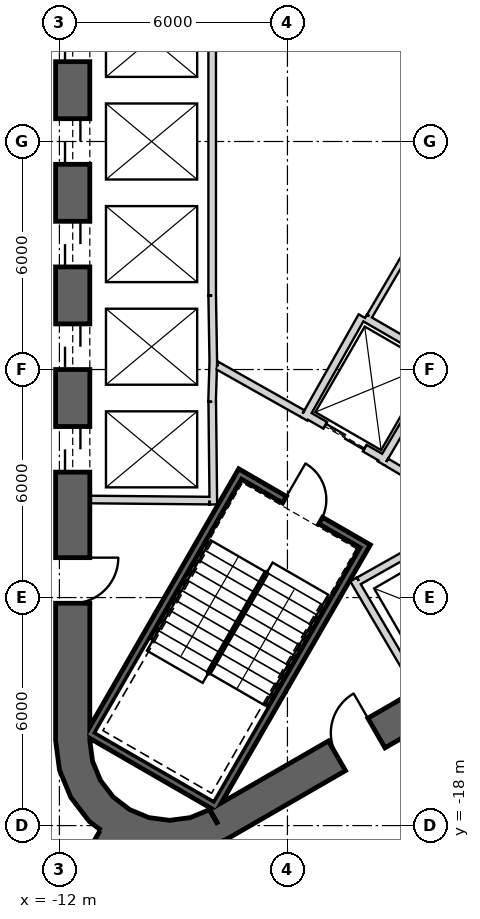
"""IFC4 building model, lengths in metres.
Left out: names, types, materials, properties, quantities, classifications, styles, units other than length and angle.
Written with IfcOpenShell. Run it as: python <this file> out.ifc"""

import sys

from ifc_helpers import new_model, si_unit, direction, frame, frame_2d, origin, place, context, subcontext, project, spatial, polyline, rectangle, outline, extrude, element, fill, save


model = new_model("IFC4")
c1 = context("Model", 3, precision=1e-05, world=origin(), true_north=direction((0.0, 1.0)))
c2 = subcontext(c1, "Body", "Model", "MODEL_VIEW")
j1 = project(units=[si_unit("LENGTHUNIT", "METRE"), si_unit("PLANEANGLEUNIT", "RADIAN")], contexts=[c1])
p1 = place(None, origin())
s1 = spatial("IfcSite", under=j1, at=p1, CompositionType="ELEMENT")
p2 = place(p1, origin())
s2 = spatial("IfcBuilding", under=s1, at=p2, CompositionType="ELEMENT")
p3 = place(p2, frame((0.0, 0.0, 131.6)))
s3 = spatial("IfcBuildingStorey", under=s2, at=p3, CompositionType="ELEMENT", Elevation=131.6)
p4 = place(p3, frame((19.475, 2.208, 0.0), z_axis=(0.0, 0.0, 1.0), x_axis=(-0.866028369851, 0.499994862586, 0.0)))
e1 = element("IfcWall", 1, at=p4, inside=s3, PredefinedType="SHEAR", context=c2, shape_type="SweptSolid", body=[
    extrude(rectangle(XDim=31.523, YDim=0.9, at=frame_2d((15.762, 0.0))), origin(), (0.0, 0.0, 1.0), 4.1),
])
p5 = place(p4, frame((7.062, 0.0, 0.0)))
e2 = element("IfcOpeningElement", 2, at=p5, cuts=e1, PredefinedType="OPENING", context=c2, shape_type="SweptSolid", body=[
    extrude(rectangle(XDim=1.2, YDim=2.4, at=frame_2d((0.6, 1.2))), frame((0.0, 0.46, 0.0), z_axis=(0.0, -1.0, 0.0), x_axis=(1.0, 0.0, 0.0)), (0.0, 0.0, 1.0), 0.92),
])
p6 = place(p4, frame((9.762, 0.0, 0.0)))
e3 = element("IfcOpeningElement", 3, at=p6, cuts=e1, PredefinedType="OPENING", context=c2, shape_type="SweptSolid", body=[
    extrude(rectangle(XDim=1.2, YDim=2.4, at=frame_2d((0.6, 1.2))), frame((0.0, 0.46, 0.0), z_axis=(0.0, -1.0, 0.0), x_axis=(1.0, 0.0, 0.0)), (0.0, 0.0, 1.0), 0.92),
])
p7 = place(p4, frame((12.462, 0.0, 0.0)))
e4 = element("IfcOpeningElement", 4, at=p7, cuts=e1, PredefinedType="OPENING", context=c2, shape_type="SweptSolid", body=[
    extrude(rectangle(XDim=1.2, YDim=2.4, at=frame_2d((0.6, 1.2))), frame((0.0, 0.46, 0.0), z_axis=(0.0, -1.0, 0.0), x_axis=(1.0, 0.0, 0.0)), (0.0, 0.0, 1.0), 0.92),
])
p8 = place(p4, frame((15.162, 0.0, 0.0)))
e5 = element("IfcOpeningElement", 5, at=p8, cuts=e1, PredefinedType="OPENING", context=c2, shape_type="SweptSolid", body=[
    extrude(rectangle(XDim=1.2, YDim=2.4, at=frame_2d((0.6, 1.2))), frame((0.0, 0.46, 0.0), z_axis=(0.0, -1.0, 0.0), x_axis=(1.0, 0.0, 0.0)), (0.0, 0.0, 1.0), 0.92),
])
p9 = place(p4, frame((17.862, 0.0, 0.0)))
e6 = element("IfcOpeningElement", 6, at=p9, cuts=e1, PredefinedType="OPENING", context=c2, shape_type="SweptSolid", body=[
    extrude(rectangle(XDim=1.2, YDim=2.4, at=frame_2d((0.6, 1.2))), frame((0.0, 0.46, 0.0), z_axis=(0.0, -1.0, 0.0), x_axis=(1.0, 0.0, 0.0)), (0.0, 0.0, 1.0), 0.92),
])
p10 = place(p4, frame((20.562, 0.0, 0.0)))
e7 = element("IfcOpeningElement", 7, at=p10, cuts=e1, PredefinedType="OPENING", context=c2, shape_type="SweptSolid", body=[
    extrude(rectangle(XDim=1.2, YDim=2.4, at=frame_2d((0.6, 1.2))), frame((0.0, 0.46, 0.0), z_axis=(0.0, -1.0, 0.0), x_axis=(1.0, 0.0, 0.0)), (0.0, 0.0, 1.0), 0.92),
])
p11 = place(p4, frame((23.262, 0.0, 0.0)))
e8 = element("IfcOpeningElement", 8, at=p11, cuts=e1, PredefinedType="OPENING", context=c2, shape_type="SweptSolid", body=[
    extrude(rectangle(XDim=1.2, YDim=2.4, at=frame_2d((0.6, 1.2))), frame((0.0, 0.46, 0.0), z_axis=(0.0, -1.0, 0.0), x_axis=(1.0, 0.0, 0.0)), (0.0, 0.0, 1.0), 0.92),
])
p12 = place(p4, frame((3.612, 0.0, 0.0)))
e9 = element("IfcOpeningElement", 9, at=p12, cuts=e1, PredefinedType="OPENING", context=c2, shape_type="SweptSolid", body=[
    extrude(rectangle(XDim=1.2, YDim=2.4, at=frame_2d((0.6, 1.2))), frame((0.0, 0.46, 0.0), z_axis=(0.0, -1.0, 0.0), x_axis=(1.0, 0.0, 0.0)), (0.0, 0.0, 1.0), 0.92),
])
p13 = place(p4, frame((26.712, 0.0, 0.0)))
e10 = element("IfcOpeningElement", 10, at=p13, cuts=e1, PredefinedType="OPENING", context=c2, shape_type="SweptSolid", body=[
    extrude(rectangle(XDim=1.2, YDim=2.4, at=frame_2d((0.6, 1.2))), frame((0.0, 0.46, 0.0), z_axis=(0.0, -1.0, 0.0), x_axis=(1.0, 0.0, 0.0)), (0.0, 0.0, 1.0), 0.92),
])
p14 = place(p3, frame((-11.65, 15.762, 0.0), z_axis=(0.0, 0.0, 1.0), x_axis=(0.0, -1.0, 0.0)))
e11 = element("IfcWall", 11, at=p14, inside=s3, PredefinedType="SHEAR", context=c2, shape_type="SweptSolid", body=[
    extrude(rectangle(XDim=31.523, YDim=0.9, at=frame_2d((15.762, 0.0))), origin(), (0.0, 0.0, 1.0), 4.1),
])
p15 = place(p14, frame((7.062, 0.0, 0.0)))
e12 = element("IfcOpeningElement", 12, at=p15, cuts=e11, PredefinedType="OPENING", context=c2, shape_type="SweptSolid", body=[
    extrude(rectangle(XDim=1.2, YDim=2.4, at=frame_2d((0.6, 1.2))), frame((0.0, 0.46, 0.0), z_axis=(0.0, -1.0, 0.0), x_axis=(1.0, 0.0, 0.0)), (0.0, 0.0, 1.0), 0.92),
])
p16 = place(p14, frame((9.762, 0.0, 0.0)))
e13 = element("IfcOpeningElement", 13, at=p16, cuts=e11, PredefinedType="OPENING", context=c2, shape_type="SweptSolid", body=[
    extrude(rectangle(XDim=1.2, YDim=2.4, at=frame_2d((0.6, 1.2))), frame((0.0, 0.46, 0.0), z_axis=(0.0, -1.0, 0.0), x_axis=(1.0, 0.0, 0.0)), (0.0, 0.0, 1.0), 0.92),
])
p17 = place(p14, frame((12.462, 0.0, 0.0)))
e14 = element("IfcOpeningElement", 14, at=p17, cuts=e11, PredefinedType="OPENING", context=c2, shape_type="SweptSolid", body=[
    extrude(rectangle(XDim=1.2, YDim=2.4, at=frame_2d((0.6, 1.2))), frame((0.0, 0.46, 0.0), z_axis=(0.0, -1.0, 0.0), x_axis=(1.0, 0.0, 0.0)), (0.0, 0.0, 1.0), 0.92),
])
p18 = place(p14, frame((15.162, 0.0, 0.0)))
e15 = element("IfcOpeningElement", 15, at=p18, cuts=e11, PredefinedType="OPENING", context=c2, shape_type="SweptSolid", body=[
    extrude(rectangle(XDim=1.2, YDim=2.4, at=frame_2d((0.6, 1.2))), frame((0.0, 0.46, 0.0), z_axis=(0.0, -1.0, 0.0), x_axis=(1.0, 0.0, 0.0)), (0.0, 0.0, 1.0), 0.92),
])
p19 = place(p14, frame((17.862, 0.0, 0.0)))
e16 = element("IfcOpeningElement", 16, at=p19, cuts=e11, PredefinedType="OPENING", context=c2, shape_type="SweptSolid", body=[
    extrude(rectangle(XDim=1.2, YDim=2.4, at=frame_2d((0.6, 1.2))), frame((0.0, 0.46, 0.0), z_axis=(0.0, -1.0, 0.0), x_axis=(1.0, 0.0, 0.0)), (0.0, 0.0, 1.0), 0.92),
])
p20 = place(p14, frame((20.562, 0.0, 0.0)))
e17 = element("IfcOpeningElement", 17, at=p20, cuts=e11, PredefinedType="OPENING", context=c2, shape_type="SweptSolid", body=[
    extrude(rectangle(XDim=1.2, YDim=2.4, at=frame_2d((0.6, 1.2))), frame((0.0, 0.46, 0.0), z_axis=(0.0, -1.0, 0.0), x_axis=(1.0, 0.0, 0.0)), (0.0, 0.0, 1.0), 0.92),
])
p21 = place(p14, frame((23.262, 0.0, 0.0)))
e18 = element("IfcOpeningElement", 18, at=p21, cuts=e11, PredefinedType="OPENING", context=c2, shape_type="SweptSolid", body=[
    extrude(rectangle(XDim=1.2, YDim=2.4, at=frame_2d((0.6, 1.2))), frame((0.0, 0.46, 0.0), z_axis=(0.0, -1.0, 0.0), x_axis=(1.0, 0.0, 0.0)), (0.0, 0.0, 1.0), 0.92),
])
p22 = place(p14, frame((3.612, 0.0, 0.0)))
e19 = element("IfcOpeningElement", 19, at=p22, cuts=e11, PredefinedType="OPENING", context=c2, shape_type="SweptSolid", body=[
    extrude(rectangle(XDim=1.2, YDim=2.4, at=frame_2d((0.6, 1.2))), frame((0.0, 0.46, 0.0), z_axis=(0.0, -1.0, 0.0), x_axis=(1.0, 0.0, 0.0)), (0.0, 0.0, 1.0), 0.92),
])
p23 = place(p14, frame((26.712, 0.0, 0.0)))
e20 = element("IfcOpeningElement", 20, at=p23, cuts=e11, PredefinedType="OPENING", context=c2, shape_type="SweptSolid", body=[
    extrude(rectangle(XDim=1.2, YDim=2.4, at=frame_2d((0.6, 1.2))), frame((0.0, 0.46, 0.0), z_axis=(0.0, -1.0, 0.0), x_axis=(1.0, 0.0, 0.0)), (0.0, 0.0, 1.0), 0.92),
])
p24 = place(p3, frame((-7.825, -17.97, 0.0), z_axis=(0.0, 0.0, 1.0), x_axis=(0.866028369851, 0.499994862586, 0.0)))
e21 = element("IfcWall", 21, at=p24, inside=s3, PredefinedType="SHEAR", context=c2, shape_type="SweptSolid", body=[
    extrude(rectangle(XDim=31.523, YDim=0.9, at=frame_2d((15.762, 0.0))), origin(), (0.0, 0.0, 1.0), 4.1),
])
p25 = place(p24, frame((7.062, 0.0, 0.0)))
e22 = element("IfcOpeningElement", 22, at=p25, cuts=e21, PredefinedType="OPENING", context=c2, shape_type="SweptSolid", body=[
    extrude(rectangle(XDim=1.2, YDim=2.4, at=frame_2d((0.6, 1.2))), frame((0.0, 0.46, 0.0), z_axis=(0.0, -1.0, 0.0), x_axis=(1.0, 0.0, 0.0)), (0.0, 0.0, 1.0), 0.92),
])
p26 = place(p24, frame((9.762, 0.0, 0.0)))
e23 = element("IfcOpeningElement", 23, at=p26, cuts=e21, PredefinedType="OPENING", context=c2, shape_type="SweptSolid", body=[
    extrude(rectangle(XDim=1.2, YDim=2.4, at=frame_2d((0.6, 1.2))), frame((0.0, 0.46, 0.0), z_axis=(0.0, -1.0, 0.0), x_axis=(1.0, 0.0, 0.0)), (0.0, 0.0, 1.0), 0.92),
])
p27 = place(p24, frame((12.462, 0.0, 0.0)))
e24 = element("IfcOpeningElement", 24, at=p27, cuts=e21, PredefinedType="OPENING", context=c2, shape_type="SweptSolid", body=[
    extrude(rectangle(XDim=1.2, YDim=2.4, at=frame_2d((0.6, 1.2))), frame((0.0, 0.46, 0.0), z_axis=(0.0, -1.0, 0.0), x_axis=(1.0, 0.0, 0.0)), (0.0, 0.0, 1.0), 0.92),
])
p28 = place(p24, frame((15.162, 0.0, 0.0)))
e25 = element("IfcOpeningElement", 25, at=p28, cuts=e21, PredefinedType="OPENING", context=c2, shape_type="SweptSolid", body=[
    extrude(rectangle(XDim=1.2, YDim=2.4, at=frame_2d((0.6, 1.2))), frame((0.0, 0.46, 0.0), z_axis=(0.0, -1.0, 0.0), x_axis=(1.0, 0.0, 0.0)), (0.0, 0.0, 1.0), 0.92),
])
p29 = place(p24, frame((17.862, 0.0, 0.0)))
e26 = element("IfcOpeningElement", 26, at=p29, cuts=e21, PredefinedType="OPENING", context=c2, shape_type="SweptSolid", body=[
    extrude(rectangle(XDim=1.2, YDim=2.4, at=frame_2d((0.6, 1.2))), frame((0.0, 0.46, 0.0), z_axis=(0.0, -1.0, 0.0), x_axis=(1.0, 0.0, 0.0)), (0.0, 0.0, 1.0), 0.92),
])
p30 = place(p24, frame((20.562, 0.0, 0.0)))
e27 = element("IfcOpeningElement", 27, at=p30, cuts=e21, PredefinedType="OPENING", context=c2, shape_type="SweptSolid", body=[
    extrude(rectangle(XDim=1.2, YDim=2.4, at=frame_2d((0.6, 1.2))), frame((0.0, 0.46, 0.0), z_axis=(0.0, -1.0, 0.0), x_axis=(1.0, 0.0, 0.0)), (0.0, 0.0, 1.0), 0.92),
])
p31 = place(p24, frame((26.712, 0.0, 0.0)))
e28 = element("IfcOpeningElement", 28, at=p31, cuts=e21, PredefinedType="OPENING", context=c2, shape_type="SweptSolid", body=[
    extrude(rectangle(XDim=1.2, YDim=2.4, at=frame_2d((0.6, 1.2))), frame((0.0, 0.46, 0.0), z_axis=(0.0, -1.0, 0.0), x_axis=(1.0, 0.0, 0.0)), (0.0, 0.0, 1.0), 0.92),
])
p32 = place(p24, frame((3.612, 0.0, 0.0)))
e29 = element("IfcOpeningElement", 29, at=p32, cuts=e21, PredefinedType="OPENING", context=c2, shape_type="SweptSolid", body=[
    extrude(rectangle(XDim=1.2, YDim=2.4, at=frame_2d((0.6, 1.2))), frame((0.0, 0.46, 0.0), z_axis=(0.0, -1.0, 0.0), x_axis=(1.0, 0.0, 0.0)), (0.0, 0.0, 1.0), 0.92),
])
p33 = place(p3, origin())
e30 = element("IfcWall", 30, at=p33, inside=s3, PredefinedType="SHEAR", context=c2, shape_type="SweptSolid", body=[
    extrude(outline(polyline([(-12.1, -15.762), (-11.998, -16.538), (-11.698, -17.262), (-11.221, -17.883), (-10.6, -18.36), (-9.876, -18.659), (-9.1, -18.762), (-8.323, -18.659), (-7.6, -18.36), (-8.05, -17.58), (-8.556, -17.79), (-9.1, -17.862), (-9.644, -17.79), (-10.15, -17.58), (-10.585, -17.247), (-10.919, -16.812), (-11.128, -16.305), (-11.2, -15.762), (-12.1, -15.762)])), origin(), (0.0, 0.0, 1.0), 4.1),
])
p34 = place(p3, frame((-10.575, -18.316, 0.0), z_axis=(0.0, 0.0, 1.0), x_axis=(-0.500005394759, -0.866022289097, 0.0)))
e31 = element("IfcWall", 31, at=p34, inside=s3, PredefinedType="SHEAR", context=c2, shape_type="SweptSolid", body=[
    extrude(rectangle(XDim=12.598, YDim=0.8, at=frame_2d((6.299, 0.0))), origin(), (0.0, 0.0, 1.0), 4.1),
])
p35 = place(p34, frame((1.3, 0.0, 0.0)))
e32 = element("IfcOpeningElement", 32, at=p35, cuts=e31, PredefinedType="OPENING", context=c2, shape_type="SweptSolid", body=[
    extrude(rectangle(XDim=1.4, YDim=2.4, at=frame_2d((0.7, 1.2))), frame((0.0, 0.41, 0.0), z_axis=(0.0, -1.0, 0.0), x_axis=(1.0, 0.0, 0.0)), (0.0, 0.0, 1.0), 0.82),
])
p36 = place(p3, frame((-7.98, 4.05, 0.0), z_axis=(0.0, 0.0, 1.0), x_axis=(0.0, -1.0, 0.0)))
e33 = element("IfcWall", 33, at=p36, inside=s3, PredefinedType="PLUMBINGWALL", context=c2, shape_type="SweptSolid", body=[
    extrude(rectangle(XDim=8.1, YDim=0.2, at=frame_2d((4.05, 0.0))), origin(), (0.0, 0.0, 1.0), 3.8),
])
p37 = place(p3, frame((-7.95, -5.772, 0.0), z_axis=(0.0, 0.0, 1.0), x_axis=(-0.030803413295, -0.999525462272, 0.0)))
e34 = element("IfcWall", 34, at=p37, inside=s3, PredefinedType="PLUMBINGWALL", context=c2, shape_type="SweptSolid", body=[
    extrude(rectangle(XDim=1.078, YDim=0.2, at=frame_2d((0.539, 0.0))), origin(), (0.0, 0.0, 1.0), 3.8),
])
p38 = place(p3, frame((-7.98, -4.05, 0.0), z_axis=(0.0, 0.0, 1.0), x_axis=(0.016809909365, -0.999858703491, 0.0)))
e35 = element("IfcWall", 35, at=p38, inside=s3, PredefinedType="PLUMBINGWALL", context=c2, shape_type="SweptSolid", body=[
    extrude(rectangle(XDim=1.844, YDim=0.2, at=frame_2d((0.922, 0.0))), origin(), (0.0, 0.0, 1.0), 3.8),
])
p39 = place(p3, frame((-7.979, -6.85, 0.0), z_axis=(0.0, 0.0, 1.0), x_axis=(0.011121475088, -0.999938154483, 0.0)))
e36 = element("IfcWall", 36, at=p39, inside=s3, PredefinedType="PLUMBINGWALL", context=c2, shape_type="SweptSolid", body=[
    extrude(rectangle(XDim=2.7, YDim=0.2, at=frame_2d((1.35, 0.0))), origin(), (0.0, 0.0, 1.0), 3.8),
])
p40 = place(p3, frame((-8.05, -9.449, 0.0), z_axis=(0.0, 0.0, 1.0), x_axis=(-0.999957467379, 0.009222983926, 0.0)))
e37 = element("IfcWall", 37, at=p40, inside=s3, PredefinedType="PLUMBINGWALL", context=c2, shape_type="SweptSolid", body=[
    extrude(rectangle(XDim=3.15, YDim=0.2, at=frame_2d((1.575, 0.0))), origin(), (0.0, 0.0, 1.0), 3.8),
])
p41 = place(p3, frame((-2.558, -14.409, 0.0), z_axis=(0.0, 0.0, 1.0), x_axis=(-0.507997497166, 0.861358544901, 0.0)))
e38 = element("IfcWall", 38, at=p41, inside=s3, PredefinedType="PLUMBINGWALL", context=c2, shape_type="SweptSolid", body=[
    extrude(rectangle(XDim=3.35, YDim=0.2, at=frame_2d((1.675, 0.0))), origin(), (0.0, 0.0, 1.0), 3.8),
])
p42 = place(p3, frame((-1.769, -10.237, 0.0), z_axis=(0.0, 0.0, 1.0), x_axis=(-0.871534483978, -0.490334215854, 0.0)))
e39 = element("IfcWall", 39, at=p42, inside=s3, PredefinedType="PLUMBINGWALL", context=c2, shape_type="SweptSolid", body=[
    extrude(rectangle(XDim=2.7, YDim=0.2, at=frame_2d((1.35, 0.0))), origin(), (0.0, 0.0, 1.0), 3.8),
])
p43 = place(p3, frame((-3.905, -10.563, -0.3), z_axis=(0.0, 0.0, 1.0), x_axis=(-0.500012932018, -0.866017937352, 0.0)))
e40 = element("IfcWall", 40, at=p43, inside=s3, PredefinedType="SHEAR", context=c2, shape_type="SweptSolid", body=[
    extrude(rectangle(XDim=8.1, YDim=0.2, at=frame_2d((4.05, 0.0))), origin(), (0.0, 0.0, 1.0), 4.1),
])
p44 = place(p3, frame((-11.282, -15.541, -0.3), z_axis=(0.0, 0.0, 1.0), x_axis=(0.866000483506, -0.500043160704, 0.0)))
e41 = element("IfcWall", 41, at=p44, inside=s3, PredefinedType="SHEAR", context=c2, shape_type="SweptSolid", body=[
    extrude(rectangle(XDim=3.8, YDim=0.2, at=frame_2d((1.9, 0.0))), origin(), (0.0, 0.0, 1.0), 4.1),
])
p45 = place(p3, frame((-7.196, -8.663, -0.3), z_axis=(0.0, 0.0, 1.0), x_axis=(-0.499997992926, -0.866026562566, 0.0)))
e42 = element("IfcWall", 42, at=p45, inside=s3, PredefinedType="SHEAR", context=c2, shape_type="SweptSolid", body=[
    extrude(rectangle(XDim=7.9, YDim=0.2, at=frame_2d((3.95, 0.0))), origin(), (0.0, 0.0, 1.0), 4.1),
])
p46 = place(p3, frame((-4.041, -10.599, -0.3), z_axis=(0.0, 0.0, 1.0), x_axis=(-0.866047807691, 0.499961193289, 0.0)))
e43 = element("IfcWall", 43, at=p46, inside=s3, PredefinedType="SHEAR", context=c2, shape_type="SweptSolid", body=[
    extrude(rectangle(XDim=3.6, YDim=0.2, at=frame_2d((1.8, 0.0))), origin(), (0.0, 0.0, 1.0), 4.1),
])
p47 = place(p46, frame((1.25, 0.0, 0.3)))
e44 = element("IfcOpeningElement", 44, at=p47, cuts=e43, PredefinedType="OPENING", context=c2, shape_type="SweptSolid", body=[
    extrude(rectangle(XDim=1.1, YDim=2.1, at=frame_2d((0.55, 1.05))), frame((0.0, 0.11, 0.0), z_axis=(0.0, -1.0, 0.0), x_axis=(1.0, 0.0, 0.0)), (0.0, 0.0, 1.0), 0.22),
])
p48 = place(p3, frame((-3.446, -8.368, 0.0), z_axis=(0.0, 0.0, 1.0), x_axis=(-0.866024647952, 0.500001309137, 0.0)))
e45 = element("IfcWall", 45, at=p48, inside=s3, PredefinedType="PLUMBINGWALL", context=c2, shape_type="SweptSolid", body=[
    extrude(rectangle(XDim=2.4, YDim=0.2, at=frame_2d((1.2, 0.0))), origin(), (0.0, 0.0, 1.0), 3.8),
])
p49 = place(p48, frame((0.6, 0.0, 0.0)))
e46 = element("IfcOpeningElement", 46, at=p49, cuts=e45, PredefinedType="OPENING", context=c2, shape_type="SweptSolid", body=[
    extrude(rectangle(XDim=1.2, YDim=2.4, at=frame_2d((0.6, 1.2))), frame((0.0, 0.11, 0.0), z_axis=(0.0, -1.0, 0.0), x_axis=(1.0, 0.0, 0.0)), (0.0, 0.0, 1.0), 0.22),
])
p50 = place(p3, frame((-5.562, -7.296, 0.0), z_axis=(0.0, 0.0, 1.0), x_axis=(0.491322718731, 0.870977603649, 0.0)))
e47 = element("IfcWall", 47, at=p50, inside=s3, PredefinedType="PLUMBINGWALL", context=c2, shape_type="SweptSolid", body=[
    extrude(rectangle(XDim=3.1, YDim=0.2, at=frame_2d((1.55, 0.0))), origin(), (0.0, 0.0, 1.0), 3.8),
])
p51 = place(p3, frame((-3.957, -4.644, 0.0), z_axis=(0.0, 0.0, 1.0), x_axis=(0.865991127953, -0.500059362782, 0.0)))
e48 = element("IfcWall", 48, at=p51, inside=s3, PredefinedType="PLUMBINGWALL", context=c2, shape_type="SweptSolid", body=[
    extrude(rectangle(XDim=2.405, YDim=0.2, at=frame_2d((1.202, 0.0))), origin(), (0.0, 0.0, 1.0), 3.8),
])
p52 = place(p3, frame((-2.012, -5.882, 0.0), z_axis=(0.0, 0.0, 1.0), x_axis=(-0.508619639323, -0.860991325447, 0.0)))
e49 = element("IfcWall", 49, at=p52, inside=s3, PredefinedType="PLUMBINGWALL", context=c2, shape_type="SweptSolid", body=[
    extrude(rectangle(XDim=3.0, YDim=0.2, at=frame_2d((1.5, 0.0))), origin(), (0.0, 0.0, 1.0), 3.8),
])
p53 = place(p3, frame((-7.849, -5.894, 0.0), z_axis=(0.0, 0.0, 1.0), x_axis=(0.871340486379, -0.490678873396, 0.0)))
e50 = element("IfcWall", 50, at=p53, inside=s3, PredefinedType="PARTITIONING", context=c2, shape_type="SweptSolid", body=[
    extrude(rectangle(XDim=2.581, YDim=0.2, at=frame_2d((1.291, 0.0))), origin(), (0.0, 0.0, 1.0), 3.8),
])
p54 = place(p3, frame((-3.401, -8.43, 0.0), z_axis=(0.0, 0.0, 1.0), x_axis=(0.860598681535, -0.509283721849, 0.0)))
e51 = element("IfcWall", 51, at=p54, inside=s3, PredefinedType="PARTITIONING", context=c2, shape_type="SweptSolid", body=[
    extrude(rectangle(XDim=2.581, YDim=0.2, at=frame_2d((1.291, 0.0))), origin(), (0.0, 0.0, 1.0), 3.8),
])
p55 = place(p54, frame((0.791, 0.0, 0.0)))
e52 = element("IfcOpeningElement", 52, at=p55, cuts=e51, PredefinedType="OPENING", context=c2, shape_type="SweptSolid", body=[
    extrude(rectangle(XDim=1.0, YDim=2.1, at=frame_2d((0.5, 1.05))), frame((0.0, 0.11, 0.0), z_axis=(0.0, -1.0, 0.0), x_axis=(1.0, 0.0, 0.0)), (0.0, 0.0, 1.0), 0.22),
])
p56 = place(p3, frame((-1.624, 0.815, 0.0), z_axis=(0.0, 0.0, 1.0), x_axis=(-0.505868173579, 0.862610799237, 0.0)))
e53 = element("IfcWall", 53, at=p56, inside=s3, PredefinedType="PLUMBINGWALL", context=c2, shape_type="SweptSolid", body=[
    extrude(rectangle(XDim=4.383, YDim=0.15, at=frame_2d((2.191, 0.0))), origin(), (0.0, 0.0, 1.0), 3.8),
])
p57 = place(p56, frame((1.855, 0.0, 0.0)))
e54 = element("IfcOpeningElement", 54, at=p57, cuts=e53, PredefinedType="OPENING", context=c2, shape_type="SweptSolid", body=[
    extrude(rectangle(XDim=0.8, YDim=2.1, at=frame_2d((0.4, 1.05))), frame((0.0, 0.085, 0.0), z_axis=(0.0, -1.0, 0.0), x_axis=(1.0, 0.0, 0.0)), (0.0, 0.0, 1.0), 0.17),
])
p58 = place(p3, frame((-3.841, -4.595, 0.0), z_axis=(0.0, 0.0, 1.0), x_axis=(0.505857207696, 0.862617229959, 0.0)))
e55 = element("IfcWall", 55, at=p58, inside=s3, PredefinedType="PLUMBINGWALL", context=c2, shape_type="SweptSolid", body=[
    extrude(rectangle(XDim=4.231, YDim=0.15, at=frame_2d((2.116, 0.0))), origin(), (0.0, 0.0, 1.0), 3.8),
])
p59 = place(p47, origin())
e56 = element("IfcDoor", 56, at=p59, inside=s3, OperationType="SINGLE_SWING_LEFT", PredefinedType="USERDEFINED", context=c2, shape_type="SweptSolid", body=[
    extrude(rectangle(XDim=1.1, YDim=2.1, at=frame_2d((0.55, 1.05))), frame((0.0, 0.025, 0.0), z_axis=(0.0, -1.0, 0.0), x_axis=(1.0, 0.0, 0.0)), (0.0, 0.0, 1.0), 0.05),
])
fill(e44, e56)
p60 = place(p49, origin())
e57 = element("IfcDoor", 57, at=p60, inside=s3, OperationType="SLIDING_TO_LEFT", PredefinedType="USERDEFINED", context=c2, shape_type="SweptSolid", body=[
    extrude(rectangle(XDim=1.2, YDim=2.4, at=frame_2d((0.6, 1.2))), frame((0.0, 0.025, 0.0), z_axis=(0.0, -1.0, 0.0), x_axis=(1.0, 0.0, 0.0)), (0.0, 0.0, 1.0), 0.05),
])
fill(e46, e57)
p61 = place(p17, origin())
e58 = element("IfcDoor", 58, at=p61, inside=s3, OperationType="SLIDING_TO_LEFT", PredefinedType="USERDEFINED", context=c2, shape_type="SweptSolid", body=[
    extrude(rectangle(XDim=1.2, YDim=2.4, at=frame_2d((0.6, 1.2))), frame((0.0, 0.025, 0.0), z_axis=(0.0, -1.0, 0.0), x_axis=(1.0, 0.0, 0.0)), (0.0, 0.0, 1.0), 0.05),
])
fill(e14, e58)
p62 = place(p18, origin())
e59 = element("IfcDoor", 59, at=p62, inside=s3, OperationType="SLIDING_TO_LEFT", PredefinedType="USERDEFINED", context=c2, shape_type="SweptSolid", body=[
    extrude(rectangle(XDim=1.2, YDim=2.4, at=frame_2d((0.6, 1.2))), frame((0.0, 0.025, 0.0), z_axis=(0.0, -1.0, 0.0), x_axis=(1.0, 0.0, 0.0)), (0.0, 0.0, 1.0), 0.05),
])
fill(e15, e59)
p63 = place(p19, origin())
e60 = element("IfcDoor", 60, at=p63, inside=s3, OperationType="SLIDING_TO_LEFT", PredefinedType="USERDEFINED", context=c2, shape_type="SweptSolid", body=[
    extrude(rectangle(XDim=1.2, YDim=2.4, at=frame_2d((0.6, 1.2))), frame((0.0, 0.025, 0.0), z_axis=(0.0, -1.0, 0.0), x_axis=(1.0, 0.0, 0.0)), (0.0, 0.0, 1.0), 0.05),
])
fill(e16, e60)
p64 = place(p20, origin())
e61 = element("IfcDoor", 61, at=p64, inside=s3, OperationType="SLIDING_TO_LEFT", PredefinedType="USERDEFINED", context=c2, shape_type="SweptSolid", body=[
    extrude(rectangle(XDim=1.2, YDim=2.4, at=frame_2d((0.6, 1.2))), frame((0.0, 0.025, 0.0), z_axis=(0.0, -1.0, 0.0), x_axis=(1.0, 0.0, 0.0)), (0.0, 0.0, 1.0), 0.05),
])
fill(e17, e61)
p65 = place(p21, origin())
e62 = element("IfcDoor", 62, at=p65, inside=s3, OperationType="SLIDING_TO_LEFT", PredefinedType="USERDEFINED", context=c2, shape_type="SweptSolid", body=[
    extrude(rectangle(XDim=1.2, YDim=2.4, at=frame_2d((0.6, 1.2))), frame((0.0, 0.025, 0.0), z_axis=(0.0, -1.0, 0.0), x_axis=(1.0, 0.0, 0.0)), (0.0, 0.0, 1.0), 0.05),
])
fill(e18, e62)
p66 = place(p23, origin())
e63 = element("IfcDoor", 63, at=p66, inside=s3, OperationType="SINGLE_SWING_LEFT", PredefinedType="USERDEFINED", context=c2, shape_type="SweptSolid", body=[
    extrude(rectangle(XDim=1.2, YDim=2.4, at=frame_2d((0.6, 1.2))), frame((0.0, 0.025, 0.0), z_axis=(0.0, -1.0, 0.0), x_axis=(1.0, 0.0, 0.0)), (0.0, 0.0, 1.0), 0.05),
])
fill(e20, e63)
p67 = place(p32, origin())
e64 = element("IfcDoor", 64, at=p67, inside=s3, OperationType="SINGLE_SWING_RIGHT", PredefinedType="USERDEFINED", context=c2, shape_type="SweptSolid", body=[
    extrude(rectangle(XDim=1.2, YDim=2.4, at=frame_2d((0.6, 1.2))), frame((0.0, 0.025, 0.0), z_axis=(0.0, -1.0, 0.0), x_axis=(1.0, 0.0, 0.0)), (0.0, 0.0, 1.0), 0.05),
])
fill(e29, e64)
save(model, sys.argv[1])
